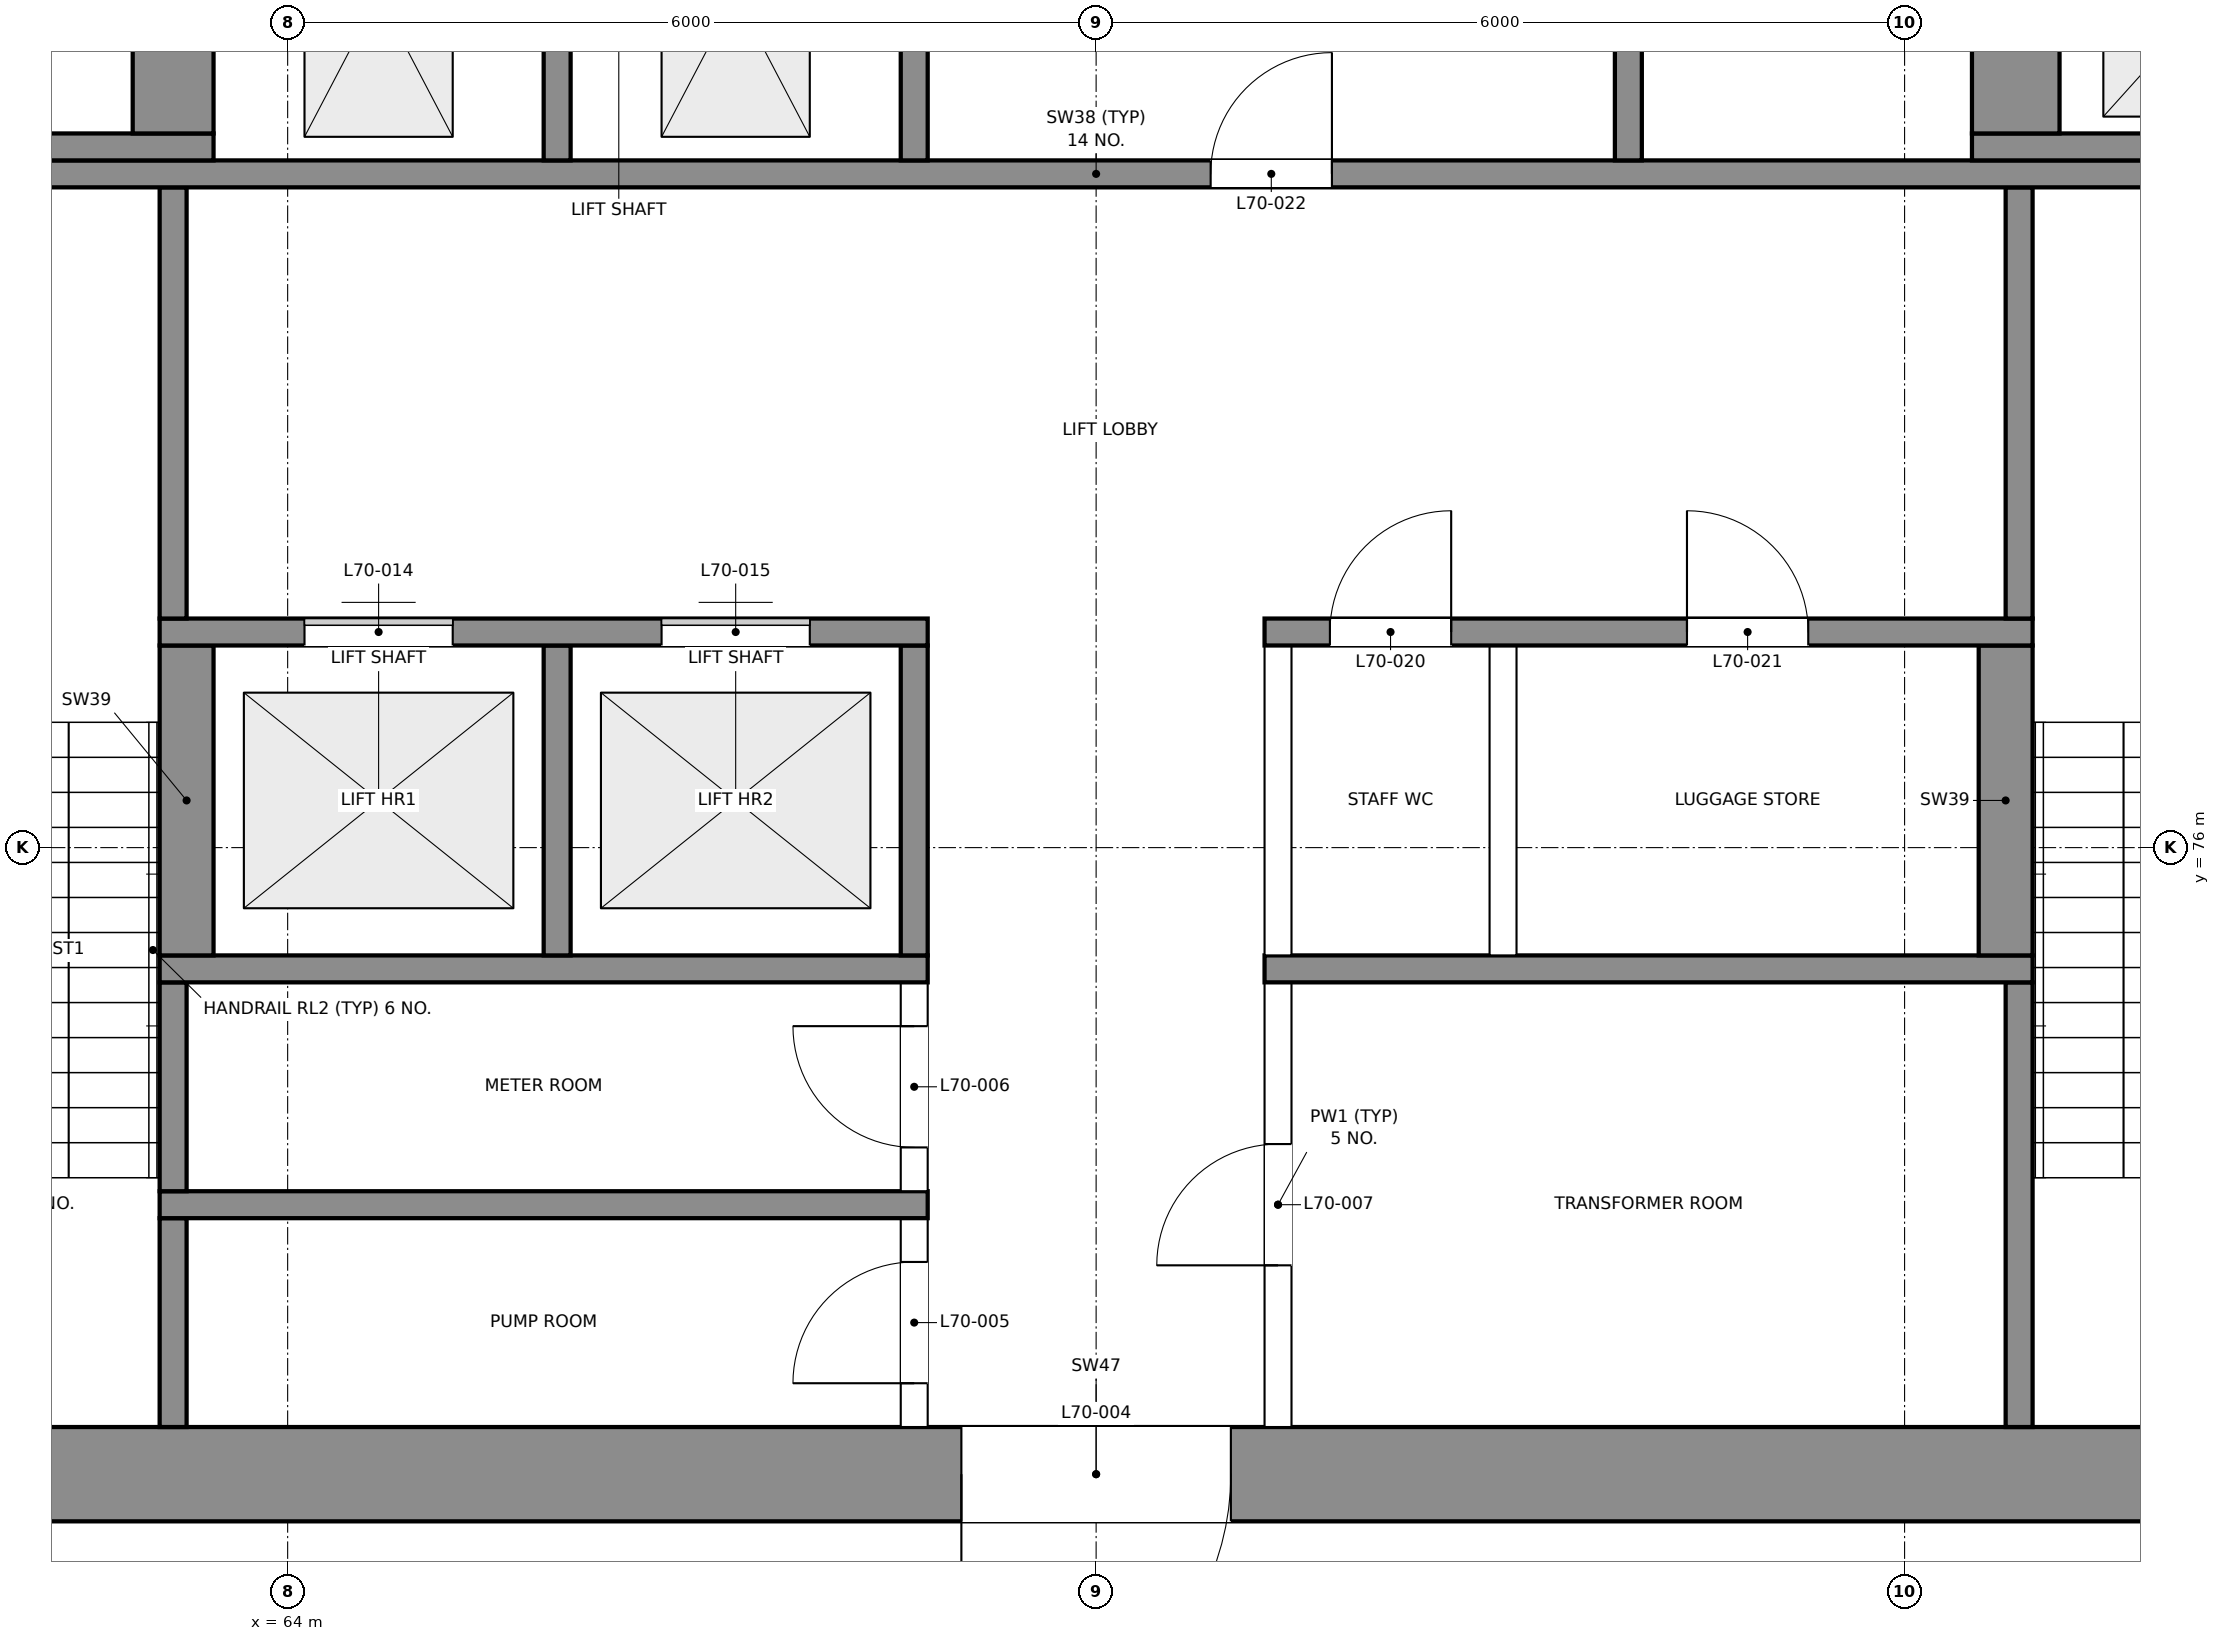
"""IFC4 building model, lengths in metres.
Left out: names, types, materials, properties, quantities, classifications, styles, units other than length and angle.
Written with IfcOpenShell. Run it as: python <this file> out.ifc"""

import sys

from ifc_helpers import new_model, si_unit, direction, frame, frame_2d, origin, place, context, subcontext, project, spatial, rectangle, extrude, element, fill, save


model = new_model("IFC4")
c1 = context("Model", 3, precision=1e-05, world=origin(), true_north=direction((0.0, 1.0)))
c2 = subcontext(c1, "Body", "Model", "MODEL_VIEW")
j1 = project(units=[si_unit("LENGTHUNIT", "METRE"), si_unit("PLANEANGLEUNIT", "RADIAN")], contexts=[c1])
p1 = place(None, origin())
s1 = spatial("IfcSite", under=j1, at=p1, CompositionType="ELEMENT")
p2 = place(p1, origin())
s2 = spatial("IfcBuilding", under=s1, at=p2, CompositionType="ELEMENT")
p3 = place(p2, frame((0.0, 0.0, 295.1)))
s3 = spatial("IfcBuildingStorey", under=s2, at=p3, CompositionType="ELEMENT", Elevation=295.1)
p4 = place(p3, frame((59.0, 71.35, 0.0), z_axis=(0.0, 0.0, 1.0), x_axis=(1.0, 0.0, 0.0)))
e1 = element("IfcWall", 1, at=p4, inside=s3, PredefinedType="SHEAR", context=c2, shape_type="SweptSolid", body=[
    extrude(rectangle(XDim=22.0, YDim=0.7, at=frame_2d((11.0, 0.0))), origin(), (0.0, 0.0, 1.0), 5.0),
])
p5 = place(p4, frame((2.025, 0.0, 0.0)))
e2 = element("IfcOpeningElement", 2, at=p5, cuts=e1, PredefinedType="OPENING", context=c2, shape_type="SweptSolid", body=[
    extrude(rectangle(XDim=1.2, YDim=2.1, at=frame_2d((0.6, 1.05))), frame((0.0, 0.36, 0.0), z_axis=(0.0, -1.0, 0.0), x_axis=(1.0, 0.0, 0.0)), (0.0, 0.0, 1.0), 0.72),
])
p6 = place(p4, frame((18.775, 0.0, 0.0)))
e3 = element("IfcOpeningElement", 3, at=p6, cuts=e1, PredefinedType="OPENING", context=c2, shape_type="SweptSolid", body=[
    extrude(rectangle(XDim=1.2, YDim=2.1, at=frame_2d((0.6, 1.05))), frame((0.0, 0.36, 0.0), z_axis=(0.0, -1.0, 0.0), x_axis=(1.0, 0.0, 0.0)), (0.0, 0.0, 1.0), 0.72),
])
p7 = place(p4, frame((10.0, 0.0, 0.0)))
e4 = element("IfcOpeningElement", 4, at=p7, cuts=e1, PredefinedType="OPENING", context=c2, shape_type="SweptSolid", body=[
    extrude(rectangle(XDim=2.0, YDim=2.1, at=frame_2d((1.0, 1.05))), frame((0.0, 0.36, 0.0), z_axis=(0.0, -1.0, 0.0), x_axis=(1.0, 0.0, 0.0)), (0.0, 0.0, 1.0), 0.72),
])
p8 = place(p3, frame((63.15, 71.7, 0.0), z_axis=(0.0, 0.0, 1.0), x_axis=(0.0, 1.0, 0.0)))
e5 = element("IfcWall", 5, at=p8, inside=s3, PredefinedType="SHEAR", context=c2, shape_type="SweptSolid", body=[
    extrude(rectangle(XDim=1.55, YDim=0.2, at=frame_2d((0.775, 0.0))), origin(), (0.0, 0.0, 1.0), 5.0),
])
p9 = place(p3, frame((68.65, 71.7, 0.0), z_axis=(0.0, 0.0, 1.0), x_axis=(0.0, 1.0, 0.0)))
e6 = element("IfcWall", 6, at=p9, inside=s3, PredefinedType="PARTITIONING", context=c2, shape_type="SweptSolid", body=[
    extrude(rectangle(XDim=1.55, YDim=0.2, at=frame_2d((0.775, 0.0))), origin(), (0.0, 0.0, 1.0), 4.6),
])
p10 = place(p9, frame((0.325, 0.0, 0.0)))
e7 = element("IfcOpeningElement", 7, at=p10, cuts=e6, PredefinedType="OPENING", context=c2, shape_type="SweptSolid", body=[
    extrude(rectangle(XDim=0.9, YDim=2.1, at=frame_2d((0.45, 1.05))), frame((0.0, 0.11, 0.0), z_axis=(0.0, -1.0, 0.0), x_axis=(1.0, 0.0, 0.0)), (0.0, 0.0, 1.0), 0.22),
])
p11 = place(p3, frame((71.35, 71.7, 0.0), z_axis=(0.0, 0.0, 1.0), x_axis=(0.0, 1.0, 0.0)))
e8 = element("IfcWall", 8, at=p11, inside=s3, PredefinedType="PARTITIONING", context=c2, shape_type="SweptSolid", body=[
    extrude(rectangle(XDim=3.3, YDim=0.2, at=frame_2d((1.65, 0.0))), origin(), (0.0, 0.0, 1.0), 4.6),
])
p12 = place(p11, frame((1.2, 0.0, 0.0)))
e9 = element("IfcOpeningElement", 9, at=p12, cuts=e8, PredefinedType="OPENING", context=c2, shape_type="SweptSolid", body=[
    extrude(rectangle(XDim=0.9, YDim=2.1, at=frame_2d((0.45, 1.05))), frame((0.0, 0.11, 0.0), z_axis=(0.0, -1.0, 0.0), x_axis=(1.0, 0.0, 0.0)), (0.0, 0.0, 1.0), 0.22),
])
p13 = place(p3, frame((76.85, 71.7, 0.0), z_axis=(0.0, 0.0, 1.0), x_axis=(0.0, 1.0, 0.0)))
e10 = element("IfcWall", 10, at=p13, inside=s3, PredefinedType="SHEAR", context=c2, shape_type="SweptSolid", body=[
    extrude(rectangle(XDim=3.3, YDim=0.2, at=frame_2d((1.65, 0.0))), origin(), (0.0, 0.0, 1.0), 5.0),
])
p14 = place(p3, frame((63.05, 73.35, 0.0), z_axis=(0.0, 0.0, 1.0), x_axis=(1.0, 0.0, 0.0)))
e11 = element("IfcWall", 11, at=p14, inside=s3, PredefinedType="SHEAR", context=c2, shape_type="SweptSolid", body=[
    extrude(rectangle(XDim=5.7, YDim=0.2, at=frame_2d((2.85, 0.0))), origin(), (0.0, 0.0, 1.0), 5.0),
])
p15 = place(p3, frame((63.15, 73.45, 0.0), z_axis=(0.0, 0.0, 1.0), x_axis=(0.0, 1.0, 0.0)))
e12 = element("IfcWall", 12, at=p15, inside=s3, PredefinedType="SHEAR", context=c2, shape_type="SweptSolid", body=[
    extrude(rectangle(XDim=1.55, YDim=0.2, at=frame_2d((0.775, 0.0))), origin(), (0.0, 0.0, 1.0), 5.0),
])
p16 = place(p3, frame((68.65, 73.45, 0.0), z_axis=(0.0, 0.0, 1.0), x_axis=(0.0, 1.0, 0.0)))
e13 = element("IfcWall", 13, at=p16, inside=s3, PredefinedType="PARTITIONING", context=c2, shape_type="SweptSolid", body=[
    extrude(rectangle(XDim=1.55, YDim=0.2, at=frame_2d((0.775, 0.0))), origin(), (0.0, 0.0, 1.0), 4.6),
])
p17 = place(p16, frame((0.325, 0.0, 0.0)))
e14 = element("IfcOpeningElement", 14, at=p17, cuts=e13, PredefinedType="OPENING", context=c2, shape_type="SweptSolid", body=[
    extrude(rectangle(XDim=0.9, YDim=2.1, at=frame_2d((0.45, 1.05))), frame((0.0, 0.11, 0.0), z_axis=(0.0, -1.0, 0.0), x_axis=(1.0, 0.0, 0.0)), (0.0, 0.0, 1.0), 0.22),
])
for number, where, z_axis, x_axis in (
    (15, (63.05, 75.1, 0.0), (0.0, 0.0, 1.0), (1.0, 0.0, 0.0)),
    (16, (71.25, 75.1, 0.0), (0.0, 0.0, 1.0), (1.0, 0.0, 0.0)),
):
    element("IfcWall", number, at=place(p3, frame(where, z_axis=z_axis, x_axis=x_axis)), inside=s3, PredefinedType="SHEAR", context=c2, shape_type="SweptSolid", body=[
        extrude(rectangle(XDim=5.7, YDim=0.2, at=frame_2d((2.85, 0.0))), origin(), (0.0, 0.0, 1.0), 5.0),
    ])
p18 = place(p3, frame((63.25, 75.2, 0.0), z_axis=(0.0, 0.0, 1.0), x_axis=(0.0, 1.0, 0.0)))
e17 = element("IfcWall", 17, at=p18, inside=s3, PredefinedType="SHEAR", context=c2, shape_type="SweptSolid", body=[
    extrude(rectangle(XDim=2.3, YDim=0.4, at=frame_2d((1.15, 0.0))), origin(), (0.0, 0.0, 1.0), 5.0),
])
for number, where, z_axis, x_axis in (
    (18, (66.0, 75.2, 0.0), (0.0, 0.0, 1.0), (0.0, 1.0, 0.0)),
    (19, (68.65, 75.2, 0.0), (0.0, 0.0, 1.0), (0.0, 1.0, 0.0)),
):
    element("IfcWall", number, at=place(p3, frame(where, z_axis=z_axis, x_axis=x_axis)), inside=s3, PredefinedType="SHEAR", context=c2, shape_type="SweptSolid", body=[
        extrude(rectangle(XDim=2.3, YDim=0.2, at=frame_2d((1.15, 0.0))), origin(), (0.0, 0.0, 1.0), 5.0),
    ])
for number, where, z_axis, x_axis in (
    (20, (71.35, 75.2, 0.0), (0.0, 0.0, 1.0), (0.0, 1.0, 0.0)),
    (21, (73.02, 75.2, 0.0), (0.0, 0.0, 1.0), (0.0, 1.0, 0.0)),
):
    element("IfcWall", number, at=place(p3, frame(where, z_axis=z_axis, x_axis=x_axis)), inside=s3, PredefinedType="PARTITIONING", context=c2, shape_type="SweptSolid", body=[
        extrude(rectangle(XDim=2.3, YDim=0.2, at=frame_2d((1.15, 0.0))), origin(), (0.0, 0.0, 1.0), 4.6),
    ])
p19 = place(p3, frame((76.75, 75.2, 0.0), z_axis=(0.0, 0.0, 1.0), x_axis=(0.0, 1.0, 0.0)))
e22 = element("IfcWall", 22, at=p19, inside=s3, PredefinedType="SHEAR", context=c2, shape_type="SweptSolid", body=[
    extrude(rectangle(XDim=2.3, YDim=0.4, at=frame_2d((1.15, 0.0))), origin(), (0.0, 0.0, 1.0), 5.0),
])
p20 = place(p3, frame((63.05, 77.6, 0.0), z_axis=(0.0, 0.0, 1.0), x_axis=(1.0, 0.0, 0.0)))
e23 = element("IfcWall", 23, at=p20, inside=s3, PredefinedType="SHEAR", context=c2, shape_type="SweptSolid", body=[
    extrude(rectangle(XDim=5.7, YDim=0.2, at=frame_2d((2.85, 0.0))), origin(), (0.0, 0.0, 1.0), 5.0),
])
p21 = place(p20, frame((1.075, 0.0, 0.0)))
e24 = element("IfcOpeningElement", 24, at=p21, cuts=e23, PredefinedType="OPENING", context=c2, shape_type="SweptSolid", body=[
    extrude(rectangle(XDim=1.1, YDim=2.1, at=frame_2d((0.55, 1.05))), frame((0.0, 0.11, 0.0), z_axis=(0.0, -1.0, 0.0), x_axis=(1.0, 0.0, 0.0)), (0.0, 0.0, 1.0), 0.22),
])
p22 = place(p20, frame((3.725, 0.0, 0.0)))
e25 = element("IfcOpeningElement", 25, at=p22, cuts=e23, PredefinedType="OPENING", context=c2, shape_type="SweptSolid", body=[
    extrude(rectangle(XDim=1.1, YDim=2.1, at=frame_2d((0.55, 1.05))), frame((0.0, 0.11, 0.0), z_axis=(0.0, -1.0, 0.0), x_axis=(1.0, 0.0, 0.0)), (0.0, 0.0, 1.0), 0.22),
])
p23 = place(p3, frame((71.25, 77.6, 0.0), z_axis=(0.0, 0.0, 1.0), x_axis=(1.0, 0.0, 0.0)))
e26 = element("IfcWall", 26, at=p23, inside=s3, PredefinedType="SHEAR", context=c2, shape_type="SweptSolid", body=[
    extrude(rectangle(XDim=5.7, YDim=0.2, at=frame_2d((2.85, 0.0))), origin(), (0.0, 0.0, 1.0), 5.0),
])
p24 = place(p23, frame((0.485, 0.0, 0.0)))
e27 = element("IfcOpeningElement", 27, at=p24, cuts=e26, PredefinedType="OPENING", context=c2, shape_type="SweptSolid", body=[
    extrude(rectangle(XDim=0.9, YDim=2.1, at=frame_2d((0.45, 1.05))), frame((0.0, 0.11, 0.0), z_axis=(0.0, -1.0, 0.0), x_axis=(1.0, 0.0, 0.0)), (0.0, 0.0, 1.0), 0.22),
])
p25 = place(p23, frame((3.135, 0.0, 0.0)))
e28 = element("IfcOpeningElement", 28, at=p25, cuts=e26, PredefinedType="OPENING", context=c2, shape_type="SweptSolid", body=[
    extrude(rectangle(XDim=0.9, YDim=2.1, at=frame_2d((0.45, 1.05))), frame((0.0, 0.11, 0.0), z_axis=(0.0, -1.0, 0.0), x_axis=(1.0, 0.0, 0.0)), (0.0, 0.0, 1.0), 0.22),
])
for number, where, z_axis, x_axis in (
    (29, (63.15, 77.7, 0.0), (0.0, 0.0, 1.0), (0.0, 1.0, 0.0)),
    (30, (76.85, 77.7, 0.0), (0.0, 0.0, 1.0), (0.0, 1.0, 0.0)),
):
    element("IfcWall", number, at=place(p3, frame(where, z_axis=z_axis, x_axis=x_axis)), inside=s3, PredefinedType="SHEAR", context=c2, shape_type="SweptSolid", body=[
        extrude(rectangle(XDim=3.2, YDim=0.2, at=frame_2d((1.6, 0.0))), origin(), (0.0, 0.0, 1.0), 5.0),
    ])
p26 = place(p3, frame((59.0, 81.0, 0.0), z_axis=(0.0, 0.0, 1.0), x_axis=(1.0, 0.0, 0.0)))
e31 = element("IfcWall", 31, at=p26, inside=s3, PredefinedType="SHEAR", context=c2, shape_type="SweptSolid", body=[
    extrude(rectangle(XDim=22.0, YDim=0.2, at=frame_2d((11.0, 0.0))), origin(), (0.0, 0.0, 1.0), 5.0),
])
p27 = place(p26, frame((11.85, 0.0, 0.0)))
e32 = element("IfcOpeningElement", 32, at=p27, cuts=e31, PredefinedType="OPENING", context=c2, shape_type="SweptSolid", body=[
    extrude(rectangle(XDim=0.9, YDim=2.1, at=frame_2d((0.45, 1.05))), frame((0.0, 0.11, 0.0), z_axis=(0.0, -1.0, 0.0), x_axis=(1.0, 0.0, 0.0)), (0.0, 0.0, 1.0), 0.22),
])
p28 = place(p3, frame((59.0, 81.2, 0.0), z_axis=(0.0, 0.0, 1.0), x_axis=(1.0, 0.0, 0.0)))
e33 = element("IfcWall", 33, at=p28, inside=s3, PredefinedType="SHEAR", context=c2, shape_type="SweptSolid", body=[
    extrude(rectangle(XDim=4.45, YDim=0.2, at=frame_2d((2.225, 0.0))), origin(), (0.0, 0.0, 1.0), 5.0),
])
for number, where, z_axis, x_axis in (
    (34, (66.0, 81.1, 0.0), (0.0, 0.0, 1.0), (0.0, 1.0, 0.0)),
    (35, (68.65, 81.1, 0.0), (0.0, 0.0, 1.0), (0.0, 1.0, 0.0)),
    (36, (73.95, 81.1, 0.0), (0.0, 0.0, 1.0), (0.0, 1.0, 0.0)),
):
    element("IfcWall", number, at=place(p3, frame(where, z_axis=z_axis, x_axis=x_axis)), inside=s3, PredefinedType="SHEAR", context=c2, shape_type="SweptSolid", body=[
        extrude(rectangle(XDim=2.45, YDim=0.2, at=frame_2d((1.225, 0.0))), origin(), (0.0, 0.0, 1.0), 5.0),
    ])
p29 = place(p3, frame((76.5, 81.2, 0.0), z_axis=(0.0, 0.0, 1.0), x_axis=(1.0, 0.0, 0.0)))
e37 = element("IfcWall", 37, at=p29, inside=s3, PredefinedType="SHEAR", context=c2, shape_type="SweptSolid", body=[
    extrude(rectangle(XDim=4.5, YDim=0.2, at=frame_2d((2.25, 0.0))), origin(), (0.0, 0.0, 1.0), 5.0),
])
p30 = place(p3, frame((63.15, 81.3, 0.0), z_axis=(0.0, 0.0, 1.0), x_axis=(0.0, 1.0, 0.0)))
e38 = element("IfcWall", 38, at=p30, inside=s3, PredefinedType="SHEAR", context=c2, shape_type="SweptSolid", body=[
    extrude(rectangle(XDim=2.25, YDim=0.6, at=frame_2d((1.125, 0.0))), origin(), (0.0, 0.0, 1.0), 5.0),
])
p31 = place(p3, frame((76.825, 81.3, 0.0), z_axis=(0.0, 0.0, 1.0), x_axis=(0.0, 1.0, 0.0)))
e39 = element("IfcWall", 39, at=p31, inside=s3, PredefinedType="SHEAR", context=c2, shape_type="SweptSolid", body=[
    extrude(rectangle(XDim=2.25, YDim=0.65, at=frame_2d((1.125, 0.0))), origin(), (0.0, 0.0, 1.0), 5.0),
])
p32 = place(p7, frame((2.0, 0.0, 0.0), z_axis=(0.0, 0.0, 1.0), x_axis=(-1.0, 0.0, 0.0)))
e40 = element("IfcDoor", 40, at=p32, inside=s3, OperationType="DOUBLE_DOOR_SINGLE_SWING", PredefinedType="DOOR", context=c2, shape_type="SweptSolid", body=[
    extrude(rectangle(XDim=2.0, YDim=2.1, at=frame_2d((1.0, 1.05))), frame((0.0, 0.025, 0.0), z_axis=(0.0, -1.0, 0.0), x_axis=(1.0, 0.0, 0.0)), (0.0, 0.0, 1.0), 0.05),
])
fill(e4, e40)
p33 = place(p10, origin())
e41 = element("IfcDoor", 41, at=p33, inside=s3, OperationType="SINGLE_SWING_LEFT", PredefinedType="DOOR", context=c2, shape_type="SweptSolid", body=[
    extrude(rectangle(XDim=0.9, YDim=2.1, at=frame_2d((0.45, 1.05))), frame((0.0, 0.025, 0.0), z_axis=(0.0, -1.0, 0.0), x_axis=(1.0, 0.0, 0.0)), (0.0, 0.0, 1.0), 0.05),
])
fill(e7, e41)
p34 = place(p17, origin())
e42 = element("IfcDoor", 42, at=p34, inside=s3, OperationType="SINGLE_SWING_RIGHT", PredefinedType="DOOR", context=c2, shape_type="SweptSolid", body=[
    extrude(rectangle(XDim=0.9, YDim=2.1, at=frame_2d((0.45, 1.05))), frame((0.0, 0.025, 0.0), z_axis=(0.0, -1.0, 0.0), x_axis=(1.0, 0.0, 0.0)), (0.0, 0.0, 1.0), 0.05),
])
fill(e14, e42)
p35 = place(p12, origin())
e43 = element("IfcDoor", 43, at=p35, inside=s3, OperationType="SINGLE_SWING_LEFT", PredefinedType="DOOR", context=c2, shape_type="SweptSolid", body=[
    extrude(rectangle(XDim=0.9, YDim=2.1, at=frame_2d((0.45, 1.05))), frame((0.0, 0.025, 0.0), z_axis=(0.0, -1.0, 0.0), x_axis=(1.0, 0.0, 0.0)), (0.0, 0.0, 1.0), 0.05),
])
fill(e9, e43)
p36 = place(p21, origin())
e44 = element("IfcDoor", 44, at=p36, inside=s3, OperationType="DOUBLE_DOOR_SLIDING", PredefinedType="DOOR", context=c2, shape_type="SweptSolid", body=[
    extrude(rectangle(XDim=1.1, YDim=2.1, at=frame_2d((0.55, 1.05))), frame((0.0, 0.025, 0.0), z_axis=(0.0, -1.0, 0.0), x_axis=(1.0, 0.0, 0.0)), (0.0, 0.0, 1.0), 0.05),
])
fill(e24, e44)
p37 = place(p22, origin())
e45 = element("IfcDoor", 45, at=p37, inside=s3, OperationType="DOUBLE_DOOR_SLIDING", PredefinedType="DOOR", context=c2, shape_type="SweptSolid", body=[
    extrude(rectangle(XDim=1.1, YDim=2.1, at=frame_2d((0.55, 1.05))), frame((0.0, 0.025, 0.0), z_axis=(0.0, -1.0, 0.0), x_axis=(1.0, 0.0, 0.0)), (0.0, 0.0, 1.0), 0.05),
])
fill(e25, e45)
p38 = place(p24, origin())
e46 = element("IfcDoor", 46, at=p38, inside=s3, OperationType="SINGLE_SWING_RIGHT", PredefinedType="DOOR", context=c2, shape_type="SweptSolid", body=[
    extrude(rectangle(XDim=0.9, YDim=2.1, at=frame_2d((0.45, 1.05))), frame((0.0, 0.025, 0.0), z_axis=(0.0, -1.0, 0.0), x_axis=(1.0, 0.0, 0.0)), (0.0, 0.0, 1.0), 0.05),
])
fill(e27, e46)
p39 = place(p25, origin())
e47 = element("IfcDoor", 47, at=p39, inside=s3, OperationType="SINGLE_SWING_LEFT", PredefinedType="DOOR", context=c2, shape_type="SweptSolid", body=[
    extrude(rectangle(XDim=0.9, YDim=2.1, at=frame_2d((0.45, 1.05))), frame((0.0, 0.025, 0.0), z_axis=(0.0, -1.0, 0.0), x_axis=(1.0, 0.0, 0.0)), (0.0, 0.0, 1.0), 0.05),
])
fill(e28, e47)
p40 = place(p27, origin())
e48 = element("IfcDoor", 48, at=p40, inside=s3, OperationType="SINGLE_SWING_RIGHT", PredefinedType="DOOR", context=c2, shape_type="SweptSolid", body=[
    extrude(rectangle(XDim=0.9, YDim=2.1, at=frame_2d((0.45, 1.05))), frame((0.0, 0.025, 0.0), z_axis=(0.0, -1.0, 0.0), x_axis=(1.0, 0.0, 0.0)), (0.0, 0.0, 1.0), 0.05),
])
fill(e32, e48)
save(model, sys.argv[1])
